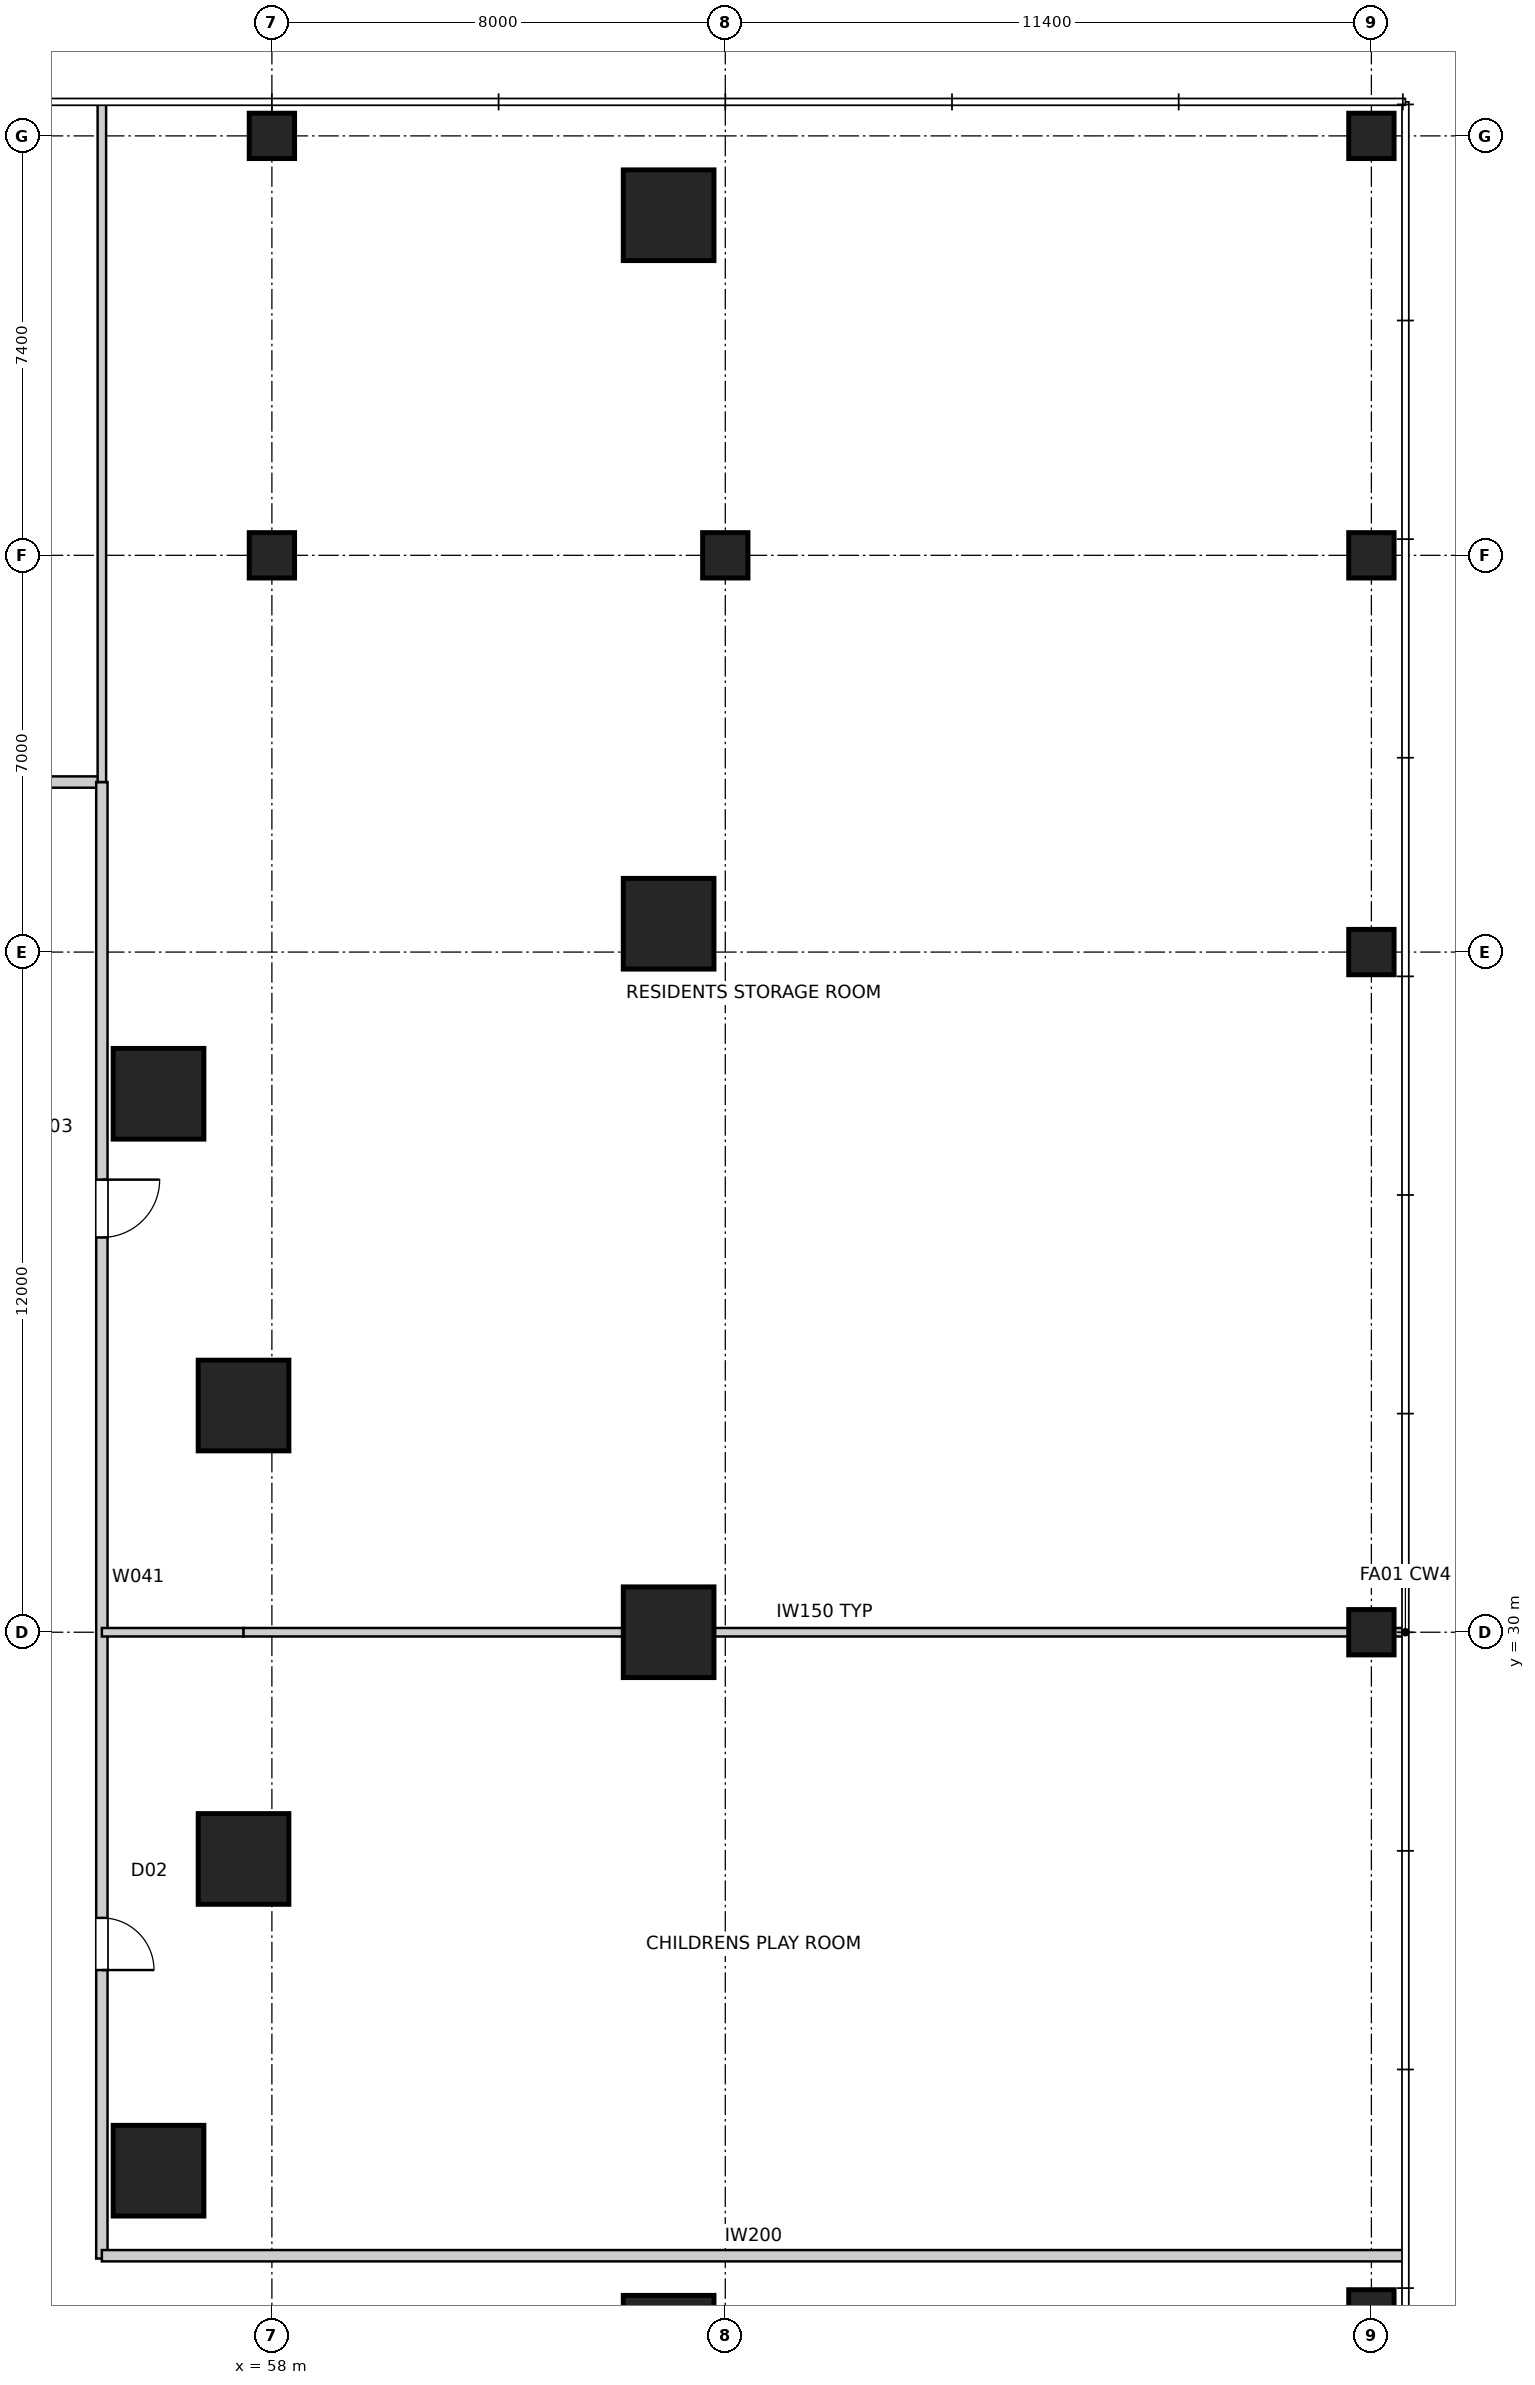
"""IFC4 building model, lengths in metres.
Left out: names, types, materials, properties, quantities, classifications, styles, units other than length and angle.
Written with IfcOpenShell. Run it as: python <this file> out.ifc"""

import sys

from ifc_helpers import new_model, si_unit, direction, frame, frame_2d, origin, origin_2d, place, context, subcontext, project, spatial, rectangle, extrude, element, fill, save


model = new_model("IFC4")
c1 = context("Model", 3, precision=1e-05, world=origin(), true_north=direction((0.0, 1.0)))
c2 = subcontext(c1, "Body", "Model", "MODEL_VIEW")
j1 = project(units=[si_unit("LENGTHUNIT", "METRE"), si_unit("PLANEANGLEUNIT", "RADIAN")], contexts=[c1])
p1 = place(None, origin())
s1 = spatial("IfcSite", under=j1, at=p1, CompositionType="ELEMENT")
p2 = place(p1, origin())
s2 = spatial("IfcBuilding", under=s1, at=p2, CompositionType="ELEMENT")
p3 = place(p2, frame((0.0, 0.0, 10.5)))
s3 = spatial("IfcBuildingStorey", under=s2, at=p3, CompositionType="ELEMENT", Elevation=10.5)
for number, where, z_axis, x_axis in (
    (1, (65.0, 17.5, 0.0), (0.0, 0.0, 1.0), (1.0, 0.0, 0.0)),
    (2, (65.0, 30.0, 0.0), (0.0, 0.0, 1.0), (1.0, 0.0, 0.0)),
    (3, (65.0, 42.5, 0.0), (0.0, 0.0, 1.0), (1.0, 0.0, 0.0)),
    (4, (65.0, 55.0, 0.0), (0.0, 0.0, 1.0), (1.0, 0.0, 0.0)),
):
    element("IfcColumn", number, at=place(p3, frame(where, z_axis=z_axis, x_axis=x_axis)), inside=s3, PredefinedType="COLUMN", context=c2, shape_type="SweptSolid", body=[
        extrude(rectangle(XDim=1.6, YDim=1.6, at=origin_2d()), origin(), (0.0, 0.0, 1.0), 4.5),
    ])
for number, where, z_axis, x_axis in (
    (5, (58.0, 49.0, 0.0), (0.0, 0.0, 1.0), (1.0, 0.0, 0.0)),
    (6, (58.0, 56.4, 0.0), (0.0, 0.0, 1.0), (1.0, 0.0, 0.0)),
    (7, (66.0, 49.0, 0.0), (0.0, 0.0, 1.0), (1.0, 0.0, 0.0)),
    (8, (77.4, 18.0, 0.0), (0.0, 0.0, 1.0), (1.0, 0.0, 0.0)),
    (9, (77.4, 30.0, 0.0), (0.0, 0.0, 1.0), (1.0, 0.0, 0.0)),
    (10, (77.4, 42.0, 0.0), (0.0, 0.0, 1.0), (1.0, 0.0, 0.0)),
    (11, (77.4, 49.0, 0.0), (0.0, 0.0, 1.0), (1.0, 0.0, 0.0)),
    (12, (77.4, 56.4, 0.0), (0.0, 0.0, 1.0), (1.0, 0.0, 0.0)),
):
    element("IfcColumn", number, at=place(p3, frame(where, z_axis=z_axis, x_axis=x_axis)), inside=s3, PredefinedType="COLUMN", context=c2, shape_type="SweptSolid", body=[
        extrude(rectangle(XDim=0.8, YDim=0.8, at=origin_2d()), origin(), (0.0, 0.0, 1.0), 4.5),
    ])
for number, where, z_axis, x_axis in (
    (13, (57.5, 26.0, 0.0), (0.0, 0.0, 1.0), (1.0, 0.0, 0.0)),
    (14, (57.5, 34.0, 0.0), (0.0, 0.0, 1.0), (1.0, 0.0, 0.0)),
    (15, (56.0, 39.5, 0.0), (0.0, 0.0, 1.0), (1.0, 0.0, 0.0)),
    (16, (56.0, 20.5, 0.0), (0.0, 0.0, 1.0), (1.0, 0.0, 0.0)),
):
    element("IfcColumn", number, at=place(p3, frame(where, z_axis=z_axis, x_axis=x_axis)), inside=s3, PredefinedType="COLUMN", context=c2, shape_type="SweptSolid", body=[
        extrude(rectangle(XDim=1.6, YDim=1.6, at=origin_2d()), origin(), (0.0, 0.0, 1.0), 4.5),
    ])
p4 = place(p3, frame((38.95, 45.0, 0.0), z_axis=(0.0, 0.0, 1.0), x_axis=(1.0, 0.0, 0.0)))
e17 = element("IfcWall", 17, at=p4, inside=s3, PredefinedType="PARTITIONING", context=c2, shape_type="SweptSolid", body=[
    extrude(rectangle(XDim=16.05, YDim=0.2, at=frame_2d((8.025, 0.0))), origin(), (0.0, 0.0, 1.0), 4.35),
])
p5 = place(p4, frame((12.015, 0.0, 0.0)))
e18 = element("IfcOpeningElement", 18, at=p5, cuts=e17, PredefinedType="OPENING", context=c2, shape_type="SweptSolid", body=[
    extrude(rectangle(XDim=1.02, YDim=2.1, at=frame_2d((0.51, 1.05))), frame((0.0, 0.11, 0.0), z_axis=(0.0, -1.0, 0.0), x_axis=(1.0, 0.0, 0.0)), (0.0, 0.0, 1.0), 0.22),
])
p6 = place(p4, frame((5.59, 0.0, 0.0)))
e19 = element("IfcOpeningElement", 19, at=p6, cuts=e17, PredefinedType="OPENING", context=c2, shape_type="SweptSolid", body=[
    extrude(rectangle(XDim=0.92, YDim=2.34, at=frame_2d((0.46, 1.17))), frame((0.0, 0.11, 0.0), z_axis=(0.0, -1.0, 0.0), x_axis=(1.0, 0.0, 0.0)), (0.0, 0.0, 1.0), 0.22),
])
p7 = place(p4, frame((1.09, 0.0, 0.0)))
e20 = element("IfcOpeningElement", 20, at=p7, cuts=e17, PredefinedType="OPENING", context=c2, shape_type="SweptSolid", body=[
    extrude(rectangle(XDim=0.92, YDim=2.34, at=frame_2d((0.46, 1.17))), frame((0.0, 0.11, 0.0), z_axis=(0.0, -1.0, 0.0), x_axis=(1.0, 0.0, 0.0)), (0.0, 0.0, 1.0), 0.22),
])
p8 = place(p3, frame((55.0, 45.0, 0.0), z_axis=(0.0, 0.0, 1.0), x_axis=(0.0, -1.0, 0.0)))
e21 = element("IfcWall", 21, at=p8, inside=s3, PredefinedType="PARTITIONING", context=c2, shape_type="SweptSolid", body=[
    extrude(rectangle(XDim=26.05, YDim=0.2, at=frame_2d((13.025, 0.0))), origin(), (0.0, 0.0, 1.0), 4.35),
])
p9 = place(p8, frame((7.015, 0.0, 0.0)))
e22 = element("IfcOpeningElement", 22, at=p9, cuts=e21, PredefinedType="OPENING", context=c2, shape_type="SweptSolid", body=[
    extrude(rectangle(XDim=1.02, YDim=2.1, at=frame_2d((0.51, 1.05))), frame((0.0, 0.11, 0.0), z_axis=(0.0, -1.0, 0.0), x_axis=(1.0, 0.0, 0.0)), (0.0, 0.0, 1.0), 0.22),
])
p10 = place(p8, frame((20.04, 0.0, 0.0)))
e23 = element("IfcOpeningElement", 23, at=p10, cuts=e21, PredefinedType="OPENING", context=c2, shape_type="SweptSolid", body=[
    extrude(rectangle(XDim=0.92, YDim=2.34, at=frame_2d((0.46, 1.17))), frame((0.0, 0.11, 0.0), z_axis=(0.0, -1.0, 0.0), x_axis=(1.0, 0.0, 0.0)), (0.0, 0.0, 1.0), 0.22),
])
p11 = place(p3, frame((55.0, 19.0, 0.0), z_axis=(0.0, 0.0, 1.0), x_axis=(1.0, 0.0, 0.0)))
e24 = element("IfcWall", 24, at=p11, inside=s3, PredefinedType="PARTITIONING", context=c2, shape_type="SweptSolid", body=[
    extrude(rectangle(XDim=23.0, YDim=0.2, at=frame_2d((11.5, 0.0))), origin(), (0.0, 0.0, 1.0), 4.35),
])
p12 = place(p3, frame((55.0, 57.0, 0.0), z_axis=(0.0, 0.0, 1.0), x_axis=(0.0, -1.0, 0.0)))
e25 = element("IfcWall", 25, at=p12, inside=s3, PredefinedType="SOLIDWALL", context=c2, shape_type="SweptSolid", body=[
    extrude(rectangle(XDim=12.0, YDim=0.15, at=frame_2d((6.0, 0.0))), origin(), (0.0, 0.0, 1.0), 4.35),
])
p13 = place(p3, frame((55.0, 30.0, 0.0), z_axis=(0.0, 0.0, 1.0), x_axis=(1.0, 0.0, 0.0)))
e26 = element("IfcWall", 26, at=p13, inside=s3, PredefinedType="SOLIDWALL", context=c2, shape_type="SweptSolid", body=[
    extrude(rectangle(XDim=2.5, YDim=0.15, at=frame_2d((1.25, 0.0))), origin(), (0.0, 0.0, 1.0), 3.895),
])
p14 = place(p3, frame((57.5, 30.0, 0.0), z_axis=(0.0, 0.0, 1.0), x_axis=(1.0, 0.0, 0.0)))
e27 = element("IfcWall", 27, at=p14, inside=s3, PredefinedType="SOLIDWALL", context=c2, shape_type="SweptSolid", body=[
    extrude(rectangle(XDim=20.5, YDim=0.15, at=frame_2d((10.25, 0.0))), origin(), (0.0, 0.0, 1.0), 4.35),
])
p15 = place(p9, origin())
e28 = element("IfcDoor", 28, at=p15, inside=s3, OperationType="SINGLE_SWING_LEFT", PredefinedType="DOOR", context=c2, shape_type="SweptSolid", body=[
    extrude(rectangle(XDim=1.02, YDim=2.1, at=frame_2d((0.51, 1.05))), frame((0.0, 0.025, 0.0), z_axis=(0.0, -1.0, 0.0), x_axis=(1.0, 0.0, 0.0)), (0.0, 0.0, 1.0), 0.05),
])
fill(e22, e28)
p16 = place(p10, origin())
e29 = element("IfcDoor", 29, at=p16, inside=s3, OperationType="SINGLE_SWING_RIGHT", PredefinedType="DOOR", context=c2, shape_type="SweptSolid", body=[
    extrude(rectangle(XDim=0.92, YDim=2.34, at=frame_2d((0.46, 1.17))), frame((0.0, 0.025, 0.0), z_axis=(0.0, -1.0, 0.0), x_axis=(1.0, 0.0, 0.0)), (0.0, 0.0, 1.0), 0.05),
])
fill(e23, e29)
save(model, sys.argv[1])
